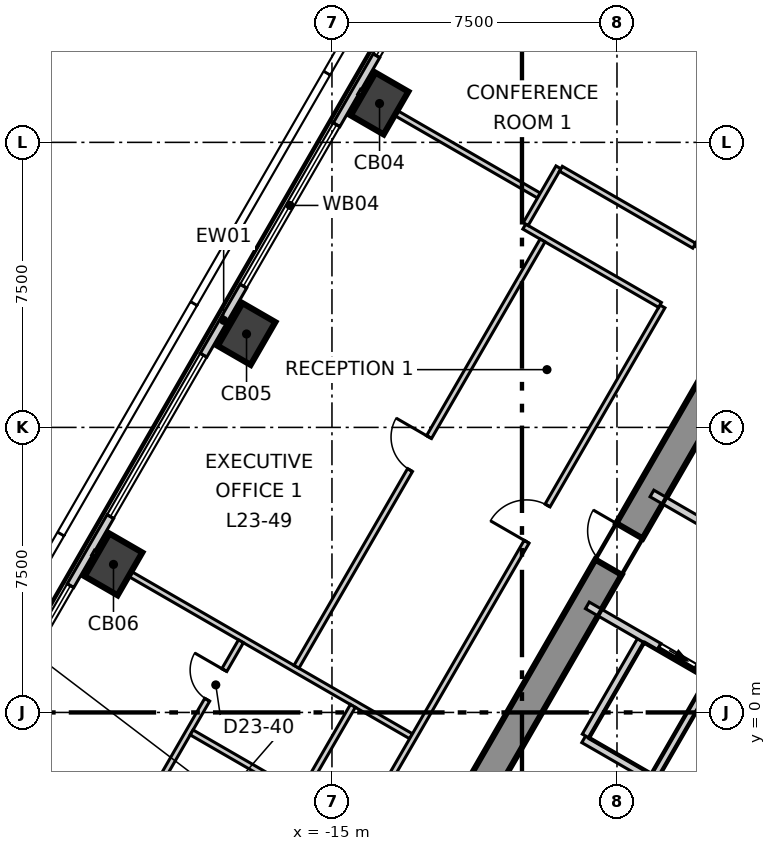
"""IFC4 building model, lengths in metres.
Left out: names, types, materials, properties, quantities, classifications, styles, units other than length and angle.
Written with IfcOpenShell. Run it as: python <this file> out.ifc"""

import sys

from ifc_helpers import new_model, si_unit, direction, frame, frame_2d, origin, origin_2d, place, context, subcontext, project, spatial, polyline, rectangle, outline, extrude, element, fill, save


model = new_model("IFC4")
c1 = context("Model", 3, precision=1e-05, world=origin(), true_north=direction((0.0, 1.0)))
c2 = subcontext(c1, "Body", "Model", "MODEL_VIEW")
j1 = project(units=[si_unit("LENGTHUNIT", "METRE"), si_unit("PLANEANGLEUNIT", "RADIAN")], contexts=[c1])
p1 = place(None, origin())
s1 = spatial("IfcSite", under=j1, at=p1, CompositionType="ELEMENT")
p2 = place(p1, origin())
s2 = spatial("IfcBuilding", under=s1, at=p2, CompositionType="ELEMENT")
p3 = place(p2, frame((0.0, 0.0, 104.3)))
s3 = spatial("IfcBuildingStorey", under=s2, at=p3, CompositionType="ELEMENT", Elevation=104.3)
p4 = place(p3, frame((-1.674, 14.3, -0.3), z_axis=(0.0, 0.0, 1.0), x_axis=(-0.499995765644, -0.866027848477, 0.0)))
e1 = element("IfcWall", 1, at=p4, inside=s3, PredefinedType="SHEAR", context=c2, shape_type="SweptSolid", body=[
    extrude(outline(polyline([(-0.231, -0.4), (1.732, -0.4), (3.695, -0.4), (5.658, -0.4), (7.621, -0.4), (9.584, -0.4), (11.547, -0.4), (13.51, -0.4), (15.473, -0.4), (17.436, -0.4), (19.399, -0.4), (21.362, -0.4), (23.325, -0.4), (22.863, 0.4), (20.977, 0.4), (19.091, 0.4), (17.205, 0.4), (15.319, 0.4), (13.433, 0.4), (11.547, 0.4), (9.661, 0.4), (7.775, 0.4), (5.889, 0.4), (4.003, 0.4), (2.117, 0.4), (0.231, 0.4), (-0.231, -0.4)])), origin(), (0.0, 0.0, 1.0), 4.0),
])
p5 = place(p4, frame((10.997, 0.0, 0.3)))
e2 = element("IfcOpeningElement", 2, at=p5, cuts=e1, PredefinedType="OPENING", context=c2, shape_type="SweptSolid", body=[
    extrude(rectangle(XDim=1.1, YDim=2.1, at=frame_2d((0.55, 1.05))), frame((0.0, 0.41, 0.0), z_axis=(0.0, -1.0, 0.0), x_axis=(1.0, 0.0, 0.0)), (0.0, 0.0, 1.0), 0.82),
])
p6 = place(p4, frame((4.474, 0.0, 0.3)))
e3 = element("IfcOpeningElement", 3, at=p6, cuts=e1, PredefinedType="OPENING", context=c2, shape_type="SweptSolid", body=[
    extrude(rectangle(XDim=0.9, YDim=2.1, at=frame_2d((0.45, 1.05))), frame((0.0, 0.41, 0.0), z_axis=(0.0, -1.0, 0.0), x_axis=(1.0, 0.0, 0.0)), (0.0, 0.0, 1.0), 0.82),
])
for number, where, z_axis, x_axis in (
    (4, (-13.748, 16.022, -0.3), (0.0, 0.0, 1.0), (0.5, 0.866, 0.0)),
    (5, (-17.248, 9.958, -0.3), (0.0, 0.0, 1.0), (0.5, 0.866, 0.0)),
    (6, (-20.749, 3.895, -0.3), (0.0, 0.0, 1.0), (0.5, 0.866, 0.0)),
):
    element("IfcColumn", number, at=place(p3, frame(where, z_axis=z_axis, x_axis=x_axis)), inside=s3, PredefinedType="COLUMN", context=c2, shape_type="SweptSolid", body=[
        extrude(rectangle(XDim=1.3, YDim=1.0, at=origin_2d()), origin(), (0.0, 0.0, 1.0), 4.0),
    ])
p7 = place(p3, frame((-3.2, 35.691, 0.0), z_axis=(0.0, 0.0, 1.0), x_axis=(-0.500010127185, -0.866019556773, 0.0)))
e7 = element("IfcWall", 7, at=p7, inside=s3, PredefinedType="ELEMENTEDWALL", context=c2, shape_type="SweptSolid", body=[
    extrude(rectangle(XDim=58.599, YDim=0.2, at=frame_2d((29.299, 0.0))), origin(), (0.0, 0.0, 1.0), 3.7),
])
p8 = place(p7, frame((2.353, 0.0, 0.9)))
e8 = element("IfcOpeningElement", 8, at=p8, cuts=e7, PredefinedType="OPENING", context=c2, shape_type="SweptSolid", body=[
    extrude(rectangle(XDim=4.9, YDim=2.5, at=frame_2d((2.45, 1.25))), frame((0.0, 0.11, 0.0), z_axis=(0.0, -1.0, 0.0), x_axis=(1.0, 0.0, 0.0)), (0.0, 0.0, 1.0), 0.22),
])
p9 = place(p7, frame((9.355, 0.0, 0.9)))
e9 = element("IfcOpeningElement", 9, at=p9, cuts=e7, PredefinedType="OPENING", context=c2, shape_type="SweptSolid", body=[
    extrude(rectangle(XDim=4.9, YDim=2.5, at=frame_2d((2.45, 1.25))), frame((0.0, 0.11, 0.0), z_axis=(0.0, -1.0, 0.0), x_axis=(1.0, 0.0, 0.0)), (0.0, 0.0, 1.0), 0.22),
])
p10 = place(p7, frame((16.357, 0.0, 0.9)))
e10 = element("IfcOpeningElement", 10, at=p10, cuts=e7, PredefinedType="OPENING", context=c2, shape_type="SweptSolid", body=[
    extrude(rectangle(XDim=4.9, YDim=2.5, at=frame_2d((2.45, 1.25))), frame((0.0, 0.11, 0.0), z_axis=(0.0, -1.0, 0.0), x_axis=(1.0, 0.0, 0.0)), (0.0, 0.0, 1.0), 0.22),
])
p11 = place(p7, frame((23.358, 0.0, 0.9)))
e11 = element("IfcOpeningElement", 11, at=p11, cuts=e7, PredefinedType="OPENING", context=c2, shape_type="SweptSolid", body=[
    extrude(rectangle(XDim=4.9, YDim=2.5, at=frame_2d((2.45, 1.25))), frame((0.0, 0.11, 0.0), z_axis=(0.0, -1.0, 0.0), x_axis=(1.0, 0.0, 0.0)), (0.0, 0.0, 1.0), 0.22),
])
p12 = place(p7, frame((30.36, 0.0, 0.9)))
e12 = element("IfcOpeningElement", 12, at=p12, cuts=e7, PredefinedType="OPENING", context=c2, shape_type="SweptSolid", body=[
    extrude(rectangle(XDim=4.9, YDim=2.5, at=frame_2d((2.45, 1.25))), frame((0.0, 0.11, 0.0), z_axis=(0.0, -1.0, 0.0), x_axis=(1.0, 0.0, 0.0)), (0.0, 0.0, 1.0), 0.22),
])
p13 = place(p7, frame((37.362, 0.0, 0.9)))
e13 = element("IfcOpeningElement", 13, at=p13, cuts=e7, PredefinedType="OPENING", context=c2, shape_type="SweptSolid", body=[
    extrude(rectangle(XDim=4.9, YDim=2.5, at=frame_2d((2.45, 1.25))), frame((0.0, 0.11, 0.0), z_axis=(0.0, -1.0, 0.0), x_axis=(1.0, 0.0, 0.0)), (0.0, 0.0, 1.0), 0.22),
])
p14 = place(p7, frame((44.363, 0.0, 0.9)))
e14 = element("IfcOpeningElement", 14, at=p14, cuts=e7, PredefinedType="OPENING", context=c2, shape_type="SweptSolid", body=[
    extrude(rectangle(XDim=4.9, YDim=2.5, at=frame_2d((2.45, 1.25))), frame((0.0, 0.11, 0.0), z_axis=(0.0, -1.0, 0.0), x_axis=(1.0, 0.0, 0.0)), (0.0, 0.0, 1.0), 0.22),
])
p15 = place(p7, frame((51.365, 0.0, 0.9)))
e15 = element("IfcOpeningElement", 15, at=p15, cuts=e7, PredefinedType="OPENING", context=c2, shape_type="SweptSolid", body=[
    extrude(rectangle(XDim=4.9, YDim=2.5, at=frame_2d((2.45, 1.25))), frame((0.0, 0.11, 0.0), z_axis=(0.0, -1.0, 0.0), x_axis=(1.0, 0.0, 0.0)), (0.0, 0.0, 1.0), 0.22),
])
p16 = place(p3, frame((-21.286, 4.205, 0.0), z_axis=(0.0, 0.0, 1.0), x_axis=(0.866007579589, -0.500030871142, 0.0)))
e16 = element("IfcWall", 16, at=p16, inside=s3, PredefinedType="PARTITIONING", context=c2, shape_type="SweptSolid", body=[
    extrude(rectangle(XDim=9.662, YDim=0.15, at=frame_2d((4.831, 0.0))), origin(), (0.0, 0.0, 1.0), 3.7),
])
p17 = place(p3, frame((-18.631, -10.669, 0.0), z_axis=(0.0, 0.0, 1.0), x_axis=(0.500015596868, 0.866016398741, 0.0)))
e17 = element("IfcWall", 17, at=p17, inside=s3, PredefinedType="PARTITIONING", context=c2, shape_type="SweptSolid", body=[
    extrude(rectangle(XDim=24.656, YDim=0.15, at=frame_2d((12.328, 0.0))), origin(), (0.0, 0.0, 1.0), 3.7),
])
p18 = place(p17, frame((17.507, 0.0, 0.0)))
e18 = element("IfcOpeningElement", 18, at=p18, cuts=e17, PredefinedType="OPENING", context=c2, shape_type="SweptSolid", body=[
    extrude(rectangle(XDim=1.1, YDim=2.1, at=frame_2d((0.55, 1.05))), frame((0.0, 0.085, 0.0), z_axis=(0.0, -1.0, 0.0), x_axis=(1.0, 0.0, 0.0)), (0.0, 0.0, 1.0), 0.17),
])
p19 = place(p17, frame((5.104, 0.0, 0.0)))
e19 = element("IfcOpeningElement", 19, at=p19, cuts=e17, PredefinedType="OPENING", context=c2, shape_type="SweptSolid", body=[
    extrude(rectangle(XDim=1.1, YDim=2.1, at=frame_2d((0.55, 1.05))), frame((0.0, 0.085, 0.0), z_axis=(0.0, -1.0, 0.0), x_axis=(1.0, 0.0, 0.0)), (0.0, 0.0, 1.0), 0.17),
])
p20 = place(p3, frame((-5.402, 12.244, 0.0), z_axis=(0.0, 0.0, 1.0), x_axis=(0.500020433321, 0.86601360628, 0.0)))
e20 = element("IfcWall", 20, at=p20, inside=s3, PredefinedType="PARTITIONING", context=c2, shape_type="SweptSolid", body=[
    extrude(rectangle(XDim=10.804, YDim=0.15, at=frame_2d((5.402, 0.0))), origin(), (0.0, 0.0, 1.0), 3.7),
])
p21 = place(p20, frame((7.954, 0.0, 0.0)))
e21 = element("IfcOpeningElement", 21, at=p21, cuts=e20, PredefinedType="OPENING", context=c2, shape_type="SweptSolid", body=[
    extrude(rectangle(XDim=1.0, YDim=2.1, at=frame_2d((0.5, 1.05))), frame((0.0, 0.085, 0.0), z_axis=(0.0, -1.0, 0.0), x_axis=(1.0, 0.0, 0.0)), (0.0, 0.0, 1.0), 0.17),
])
p22 = place(p20, frame((2.551, 0.0, 0.0)))
e22 = element("IfcOpeningElement", 22, at=p22, cuts=e20, PredefinedType="OPENING", context=c2, shape_type="SweptSolid", body=[
    extrude(rectangle(XDim=1.0, YDim=2.1, at=frame_2d((0.5, 1.05))), frame((0.0, 0.085, 0.0), z_axis=(0.0, -1.0, 0.0), x_axis=(1.0, 0.0, 0.0)), (0.0, 0.0, 1.0), 0.17),
])
p23 = place(p3, frame((-14.285, 16.332, 0.0), z_axis=(0.0, 0.0, 1.0), x_axis=(0.86601735395, -0.500013942463, 0.0)))
e23 = element("IfcWall", 23, at=p23, inside=s3, PredefinedType="PARTITIONING", context=c2, shape_type="SweptSolid", body=[
    extrude(rectangle(XDim=5.462, YDim=0.15, at=frame_2d((2.731, 0.0))), origin(), (0.0, 0.0, 1.0), 3.7),
])
p24 = place(p3, frame((-9.94, 12.784, 0.0), z_axis=(0.0, 0.0, 1.0), x_axis=(0.866056461986, -0.499946201759, 0.0)))
e24 = element("IfcWall", 24, at=p24, inside=s3, PredefinedType="PARTITIONING", context=c2, shape_type="SweptSolid", body=[
    extrude(rectangle(XDim=4.125, YDim=0.15, at=frame_2d((2.062, 0.0))), origin(), (0.0, 0.0, 1.0), 3.7),
])
p25 = place(p3, frame((-9.902, 12.849, 0.0), z_axis=(0.0, 0.0, 1.0), x_axis=(0.499808228569, 0.866136094765, 0.0)))
e25 = element("IfcWall", 25, at=p25, inside=s3, PredefinedType="PARTITIONING", context=c2, shape_type="SweptSolid", body=[
    extrude(rectangle(XDim=1.725, YDim=0.15, at=frame_2d((0.862, 0.0))), origin(), (0.0, 0.0, 1.0), 3.7),
])
p26 = place(p3, frame((-8.975, 14.305, 0.0), z_axis=(0.0, 0.0, 1.0), x_axis=(0.866120332886, -0.499835541916, 0.0)))
e26 = element("IfcWall", 26, at=p26, inside=s3, PredefinedType="PARTITIONING", context=c2, shape_type="SweptSolid", body=[
    extrude(rectangle(XDim=4.049, YDim=0.15, at=frame_2d((2.024, 0.0))), origin(), (0.0, 0.0, 1.0), 3.7),
])
p27 = place(p3, frame((-20.157, -2.913, 0.0), z_axis=(0.0, 0.0, 1.0), x_axis=(0.499898410332, 0.866084048662, 0.0)))
e27 = element("IfcWall", 27, at=p27, inside=s3, PredefinedType="PARTITIONING", context=c2, shape_type="SweptSolid", body=[
    extrude(rectangle(XDim=5.525, YDim=0.15, at=frame_2d((2.763, 0.0))), origin(), (0.0, 0.0, 1.0), 3.7),
])
p28 = place(p27, frame((3.75, 0.0, 0.0)))
e28 = element("IfcOpeningElement", 28, at=p28, cuts=e27, PredefinedType="OPENING", context=c2, shape_type="SweptSolid", body=[
    extrude(rectangle(XDim=0.9, YDim=2.1, at=frame_2d((0.45, 1.05))), frame((0.0, 0.085, 0.0), z_axis=(0.0, -1.0, 0.0), x_axis=(1.0, 0.0, 0.0)), (0.0, 0.0, 1.0), 0.17),
])
p29 = place(p3, frame((-17.175, -4.548, 0.0), z_axis=(0.0, 0.0, 1.0), x_axis=(0.499983534837, 0.866034909742, 0.0)))
e29 = element("IfcWall", 29, at=p29, inside=s3, PredefinedType="PARTITIONING", context=c2, shape_type="SweptSolid", body=[
    extrude(rectangle(XDim=5.45, YDim=0.15, at=frame_2d((2.725, 0.0))), origin(), (0.0, 0.0, 1.0), 3.7),
])
p30 = place(p3, frame((-18.692, -0.526, 0.0), z_axis=(0.0, 0.0, 1.0), x_axis=(0.865977875238, -0.500082312822, 0.0)))
e30 = element("IfcWall", 30, at=p30, inside=s3, PredefinedType="PARTITIONING", context=c2, shape_type="SweptSolid", body=[
    extrude(rectangle(XDim=3.25, YDim=0.15, at=frame_2d((1.625, 0.0))), origin(), (0.0, 0.0, 1.0), 3.7),
])
p31 = place(p3, frame((-15.934, 1.202, 0.0), z_axis=(0.0, 0.0, 1.0), x_axis=(0.499994937304, 0.866028326714, 0.0)))
e31 = element("IfcWall", 31, at=p31, inside=s3, PredefinedType="PARTITIONING", context=c2, shape_type="SweptSolid", body=[
    extrude(rectangle(XDim=12.952, YDim=0.15, at=frame_2d((6.476, 0.0))), origin(), (0.0, 0.0, 1.0), 3.7),
])
p32 = place(p31, frame((5.977, 0.0, 0.0)))
e32 = element("IfcOpeningElement", 32, at=p32, cuts=e31, PredefinedType="OPENING", context=c2, shape_type="SweptSolid", body=[
    extrude(rectangle(XDim=1.0, YDim=2.1, at=frame_2d((0.5, 1.05))), frame((0.0, 0.085, 0.0), z_axis=(0.0, -1.0, 0.0), x_axis=(1.0, 0.0, 0.0)), (0.0, 0.0, 1.0), 0.17),
])
p33 = place(p3, frame((-8.376, -0.707, 0.0), z_axis=(0.0, 0.0, 1.0), x_axis=(0.866067520717, -0.499927044236, 0.0)))
e33 = element("IfcWall", 33, at=p33, inside=s3, PredefinedType="SOLIDWALL", context=c2, shape_type="SweptSolid", body=[
    extrude(rectangle(XDim=2.1, YDim=0.2, at=frame_2d((1.05, 0.0))), origin(), (0.0, 0.0, 1.0), 3.7),
])
p34 = place(p3, frame((-8.326, -0.62, 0.0), z_axis=(0.0, 0.0, 1.0), x_axis=(0.500023687443, 0.866011727401, 0.0)))
e34 = element("IfcWall", 34, at=p34, inside=s3, PredefinedType="SOLIDWALL", context=c2, shape_type="SweptSolid", body=[
    extrude(rectangle(XDim=2.9, YDim=0.2, at=frame_2d((1.45, 0.0))), origin(), (0.0, 0.0, 1.0), 3.7),
])
p35 = place(p3, frame((-8.28, 2.818, 0.0), z_axis=(0.0, 0.0, 1.0), x_axis=(0.86600175068, -0.50004096614, 0.0)))
e35 = element("IfcWall", 35, at=p35, inside=s3, PredefinedType="SOLIDWALL", context=c2, shape_type="SweptSolid", body=[
    extrude(rectangle(XDim=3.782, YDim=0.2, at=frame_2d((1.891, 0.0))), origin(), (0.0, 0.0, 1.0), 3.7),
])
p36 = place(p35, frame((2.18, 0.0, 0.0)))
e36 = element("IfcOpeningElement", 36, at=p36, cuts=e35, PredefinedType="OPENING", context=c2, shape_type="SweptSolid", body=[
    extrude(rectangle(XDim=1.1, YDim=2.1, at=frame_2d((0.55, 1.05))), frame((0.0, 0.11, 0.0), z_axis=(0.0, -1.0, 0.0), x_axis=(1.0, 0.0, 0.0)), (0.0, 0.0, 1.0), 0.22),
])
p37 = place(p3, frame((-6.58, 5.762, 0.0), z_axis=(0.0, 0.0, 1.0), x_axis=(0.866029704776, -0.49999255039, 0.0)))
e37 = element("IfcWall", 37, at=p37, inside=s3, PredefinedType="SOLIDWALL", context=c2, shape_type="SweptSolid", body=[
    extrude(rectangle(XDim=3.782, YDim=0.2, at=frame_2d((1.891, 0.0))), origin(), (0.0, 0.0, 1.0), 3.7),
])
p38 = place(p37, frame((2.279, 0.0, 0.0)))
e38 = element("IfcOpeningElement", 38, at=p38, cuts=e37, PredefinedType="OPENING", context=c2, shape_type="SweptSolid", body=[
    extrude(rectangle(XDim=0.9, YDim=2.1, at=frame_2d((0.45, 1.05))), frame((0.0, 0.11, 0.0), z_axis=(0.0, -1.0, 0.0), x_axis=(1.0, 0.0, 0.0)), (0.0, 0.0, 1.0), 0.22),
])
p39 = place(p3, frame((-6.507, -1.67, 0.0), z_axis=(0.0, 0.0, 1.0), x_axis=(0.50012328804, 0.865954211699, 0.0)))
e39 = element("IfcWall", 39, at=p39, inside=s3, PredefinedType="SOLIDWALL", context=c2, shape_type="SweptSolid", body=[
    extrude(rectangle(XDim=2.9, YDim=0.2, at=frame_2d((1.45, 0.0))), origin(), (0.0, 0.0, 1.0), 3.7),
])
p40 = place(p10, origin())
e40 = element("IfcWindow", 40, at=p40, inside=s3, PartitioningType="SINGLE_PANEL", PredefinedType="WINDOW", context=c2, shape_type="SweptSolid", body=[
    extrude(rectangle(XDim=4.9, YDim=2.5, at=frame_2d((2.45, 1.25))), frame((0.0, 0.03, 0.0), z_axis=(0.0, -1.0, 0.0), x_axis=(1.0, 0.0, 0.0)), (0.0, 0.0, 1.0), 0.06),
])
fill(e10, e40)
p41 = place(p11, origin())
e41 = element("IfcWindow", 41, at=p41, inside=s3, PartitioningType="SINGLE_PANEL", PredefinedType="WINDOW", context=c2, shape_type="SweptSolid", body=[
    extrude(rectangle(XDim=4.9, YDim=2.5, at=frame_2d((2.45, 1.25))), frame((0.0, 0.03, 0.0), z_axis=(0.0, -1.0, 0.0), x_axis=(1.0, 0.0, 0.0)), (0.0, 0.0, 1.0), 0.06),
])
fill(e11, e41)
p42 = place(p12, origin())
e42 = element("IfcWindow", 42, at=p42, inside=s3, PartitioningType="SINGLE_PANEL", PredefinedType="WINDOW", context=c2, shape_type="SweptSolid", body=[
    extrude(rectangle(XDim=4.9, YDim=2.5, at=frame_2d((2.45, 1.25))), frame((0.0, 0.03, 0.0), z_axis=(0.0, -1.0, 0.0), x_axis=(1.0, 0.0, 0.0)), (0.0, 0.0, 1.0), 0.06),
])
fill(e12, e42)
p43 = place(p13, origin())
e43 = element("IfcWindow", 43, at=p43, inside=s3, PartitioningType="SINGLE_PANEL", PredefinedType="WINDOW", context=c2, shape_type="SweptSolid", body=[
    extrude(rectangle(XDim=4.9, YDim=2.5, at=frame_2d((2.45, 1.25))), frame((0.0, 0.03, 0.0), z_axis=(0.0, -1.0, 0.0), x_axis=(1.0, 0.0, 0.0)), (0.0, 0.0, 1.0), 0.06),
])
fill(e13, e43)
p44 = place(p36, origin())
e44 = element("IfcDoor", 44, at=p44, inside=s3, OperationType="SLIDING_TO_LEFT", PredefinedType="DOOR", context=c2, shape_type="SweptSolid", body=[
    extrude(rectangle(XDim=1.1, YDim=2.1, at=frame_2d((0.55, 1.05))), frame((0.0, 0.025, 0.0), z_axis=(0.0, -1.0, 0.0), x_axis=(1.0, 0.0, 0.0)), (0.0, 0.0, 1.0), 0.05),
])
fill(e36, e44)
p45 = place(p18, origin())
e45 = element("IfcDoor", 45, at=p45, inside=s3, OperationType="SINGLE_SWING_RIGHT", PredefinedType="DOOR", context=c2, shape_type="SweptSolid", body=[
    extrude(rectangle(XDim=1.1, YDim=2.1, at=frame_2d((0.55, 1.05))), frame((0.0, 0.025, 0.0), z_axis=(0.0, -1.0, 0.0), x_axis=(1.0, 0.0, 0.0)), (0.0, 0.0, 1.0), 0.05),
])
fill(e18, e45)
p46 = place(p32, origin())
e46 = element("IfcDoor", 46, at=p46, inside=s3, OperationType="SINGLE_SWING_LEFT", PredefinedType="DOOR", context=c2, shape_type="SweptSolid", body=[
    extrude(rectangle(XDim=1.0, YDim=2.1, at=frame_2d((0.5, 1.05))), frame((0.0, 0.025, 0.0), z_axis=(0.0, -1.0, 0.0), x_axis=(1.0, 0.0, 0.0)), (0.0, 0.0, 1.0), 0.05),
])
fill(e32, e46)
p47 = place(p28, origin())
e47 = element("IfcDoor", 47, at=p47, inside=s3, OperationType="SINGLE_SWING_LEFT", PredefinedType="DOOR", context=c2, shape_type="SweptSolid", body=[
    extrude(rectangle(XDim=0.9, YDim=2.1, at=frame_2d((0.45, 1.05))), frame((0.0, 0.025, 0.0), z_axis=(0.0, -1.0, 0.0), x_axis=(1.0, 0.0, 0.0)), (0.0, 0.0, 1.0), 0.05),
])
fill(e28, e47)
p48 = place(p5, origin())
e48 = element("IfcDoor", 48, at=p48, inside=s3, OperationType="SINGLE_SWING_LEFT", PredefinedType="DOOR", context=c2, shape_type="SweptSolid", body=[
    extrude(rectangle(XDim=1.1, YDim=2.1, at=frame_2d((0.55, 1.05))), frame((0.0, 0.025, 0.0), z_axis=(0.0, -1.0, 0.0), x_axis=(1.0, 0.0, 0.0)), (0.0, 0.0, 1.0), 0.05),
])
fill(e2, e48)
save(model, sys.argv[1])
